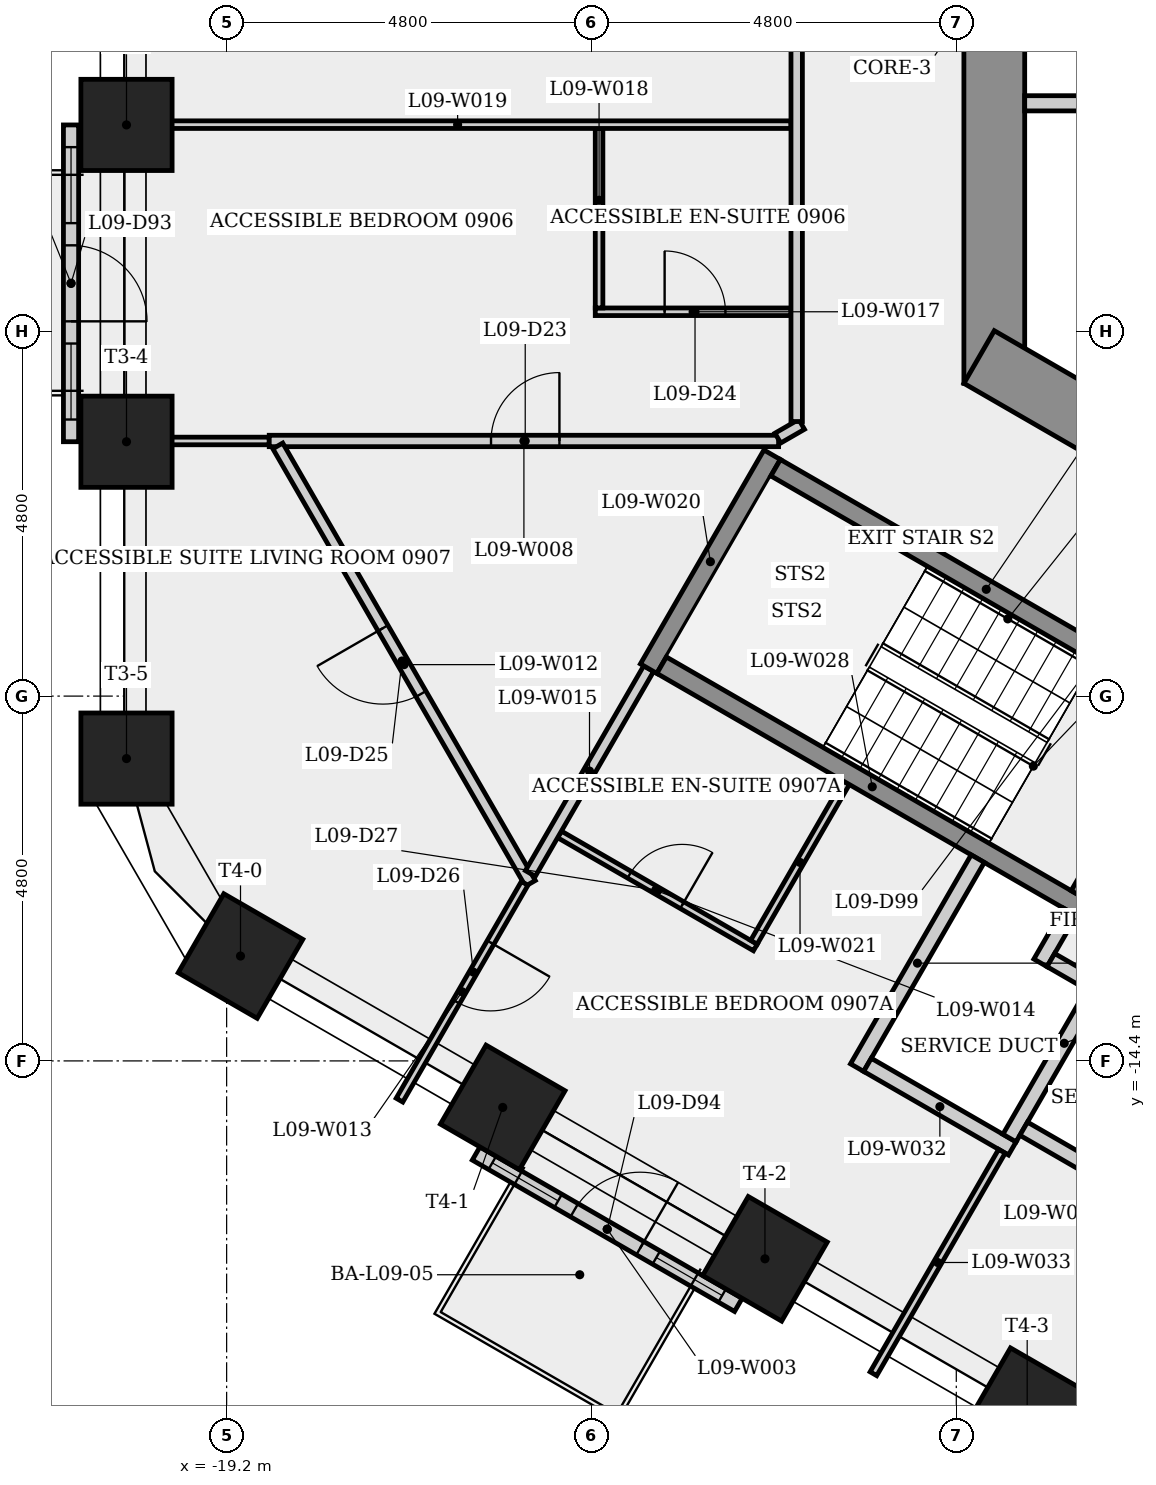
"""IFC4 building model, lengths in metres.
Left out: names, types, materials, properties, quantities, classifications, styles, units other than length and angle.
Written with IfcOpenShell. Run it as: python <this file> out.ifc"""

import sys

from ifc_helpers import new_model, si_unit, direction, frame, frame_2d, origin, origin_2d, place, context, subcontext, project, spatial, rectangle, extrude, element, fill, save


model = new_model("IFC4")
c1 = context("Model", 3, precision=1e-05, world=origin(), true_north=direction((0.0, 1.0)))
c2 = subcontext(c1, "Body", "Model", "MODEL_VIEW")
j1 = project(units=[si_unit("LENGTHUNIT", "METRE"), si_unit("PLANEANGLEUNIT", "RADIAN")], contexts=[c1])
p1 = place(None, origin())
s1 = spatial("IfcSite", under=j1, at=p1, CompositionType="ELEMENT")
p2 = place(p1, origin())
s2 = spatial("IfcBuilding", under=s1, at=p2, CompositionType="ELEMENT")
p3 = place(p2, frame((0.0, 0.0, 39.1)))
s3 = spatial("IfcBuildingStorey", under=s2, at=p3, CompositionType="ELEMENT", Elevation=39.1)
p4 = place(p3, frame((-9.1, 5.485, 0.0), z_axis=(0.0, 0.0, 1.0), x_axis=(0.0, -1.0, 0.0)))
e1 = element("IfcWall", 1, at=p4, inside=s3, PredefinedType="SHEAR", context=c2, shape_type="SweptSolid", body=[
    extrude(rectangle(XDim=10.97, YDim=0.8, at=frame_2d((5.485, 0.0))), origin(), (0.0, 0.0, 1.0), 3.4),
])
p5 = place(p4, frame((4.685, 0.0, 0.0)))
e2 = element("IfcOpeningElement", 2, at=p5, cuts=e1, PredefinedType="OPENING", context=c2, shape_type="SweptSolid", body=[
    extrude(rectangle(XDim=1.6, YDim=2.1, at=frame_2d((0.8, 1.05))), frame((0.0, 0.41, 0.0), z_axis=(0.0, -1.0, 0.0), x_axis=(1.0, 0.0, 0.0)), (0.0, 0.0, 1.0), 0.82),
])
p6 = place(p3, frame((-9.3, -5.138, 0.0), z_axis=(0.0, 0.0, 1.0), x_axis=(0.866023993627, -0.500002442456, 0.0)))
e3 = element("IfcWall", 3, at=p6, inside=s3, PredefinedType="SHEAR", context=c2, shape_type="SweptSolid", body=[
    extrude(rectangle(XDim=10.97, YDim=0.8, at=frame_2d((5.485, 0.0))), origin(), (0.0, 0.0, 1.0), 3.4),
])
p7 = place(p6, frame((3.192, 0.0, 0.0)))
e4 = element("IfcOpeningElement", 4, at=p7, cuts=e3, PredefinedType="OPENING", context=c2, shape_type="SweptSolid", body=[
    extrude(rectangle(XDim=0.9, YDim=2.1, at=frame_2d((0.45, 1.05))), frame((0.0, 0.41, 0.0), z_axis=(0.0, -1.0, 0.0), x_axis=(1.0, 0.0, 0.0)), (0.0, 0.0, 1.0), 0.82),
])
for number, where, z_axis, x_axis in (
    (5, (-20.518, -2.084, 0.0), (0.0, 0.0, 1.0), (-1.0, 0.0, 0.0)),
    (6, (-20.518, -6.253, 0.0), (0.0, 0.0, 1.0), (-1.0, 0.0, 0.0)),
    (7, (-20.518, -10.422, 0.0), (0.0, 0.0, 1.0), (-1.0, 0.0, 0.0)),
    (8, (-19.018, -13.02, 0.0), (0.0, 0.0, 1.0), (-0.5, -0.866, 0.0)),
    (9, (-15.567, -15.012, 0.0), (0.0, 0.0, 1.0), (-0.5, -0.866, 0.0)),
    (10, (-12.117, -17.004, 0.0), (0.0, 0.0, 1.0), (-0.5, -0.866, 0.0)),
    (11, (-8.667, -18.996, 0.0), (0.0, 0.0, 1.0), (-0.5, -0.866, 0.0)),
):
    element("IfcColumn", number, at=place(p3, frame(where, z_axis=z_axis, x_axis=x_axis)), inside=s3, PredefinedType="COLUMN", context=c2, shape_type="SweptSolid", body=[
        extrude(rectangle(XDim=1.2, YDim=1.2, at=origin_2d()), origin(), (0.0, 0.0, 1.0), 3.4),
    ])
p8 = place(p3, frame((-21.247, -2.085, 0.0), z_axis=(0.0, 0.0, 1.0), x_axis=(0.0, -1.0, 0.0)))
e12 = element("IfcWall", 12, at=p8, inside=s3, PredefinedType="SOLIDWALL", context=c2, shape_type="SweptSolid", body=[
    extrude(rectangle(XDim=4.168, YDim=0.2, at=frame_2d((2.084, 0.0))), origin(), (0.0, 0.0, 1.0), 3.4),
])
p9 = place(p8, frame((1.584, 0.0, 0.0)))
e13 = element("IfcOpeningElement", 13, at=p9, cuts=e12, PredefinedType="OPENING", context=c2, shape_type="SweptSolid", body=[
    extrude(rectangle(XDim=1.0, YDim=2.4, at=frame_2d((0.5, 1.2))), frame((0.0, 0.11, 0.0), z_axis=(0.0, -1.0, 0.0), x_axis=(1.0, 0.0, 0.0)), (0.0, 0.0, 1.0), 0.22),
])
p10 = place(p8, frame((0.292, 0.0, 0.9)))
e14 = element("IfcOpeningElement", 14, at=p10, cuts=e12, PredefinedType="OPENING", context=c2, shape_type="SweptSolid", body=[
    extrude(rectangle(XDim=1.0, YDim=1.5, at=frame_2d((0.5, 0.75))), frame((0.0, 0.11, 0.0), z_axis=(0.0, -1.0, 0.0), x_axis=(1.0, 0.0, 0.0)), (0.0, 0.0, 1.0), 0.22),
])
p11 = place(p8, frame((2.876, 0.0, 0.9)))
e15 = element("IfcOpeningElement", 15, at=p11, cuts=e12, PredefinedType="OPENING", context=c2, shape_type="SweptSolid", body=[
    extrude(rectangle(XDim=1.0, YDim=1.5, at=frame_2d((0.5, 0.75))), frame((0.0, 0.11, 0.0), z_axis=(0.0, -1.0, 0.0), x_axis=(1.0, 0.0, 0.0)), (0.0, 0.0, 1.0), 0.22),
])
p12 = place(p3, frame((-15.918, -15.618, 0.0), z_axis=(0.0, 0.0, 1.0), x_axis=(0.86602842894, -0.499994760241, 0.0)))
e16 = element("IfcWall", 16, at=p12, inside=s3, PredefinedType="SOLIDWALL", context=c2, shape_type="SweptSolid", body=[
    extrude(rectangle(XDim=3.984, YDim=0.2, at=frame_2d((1.992, 0.0))), origin(), (0.0, 0.0, 1.0), 3.4),
])
p13 = place(p12, frame((1.492, 0.0, 0.0)))
e17 = element("IfcOpeningElement", 17, at=p13, cuts=e16, PredefinedType="OPENING", context=c2, shape_type="SweptSolid", body=[
    extrude(rectangle(XDim=1.0, YDim=2.4, at=frame_2d((0.5, 1.2))), frame((0.0, 0.11, 0.0), z_axis=(0.0, -1.0, 0.0), x_axis=(1.0, 0.0, 0.0)), (0.0, 0.0, 1.0), 0.22),
])
p14 = place(p12, frame((0.246, 0.0, 0.9)))
e18 = element("IfcOpeningElement", 18, at=p14, cuts=e16, PredefinedType="OPENING", context=c2, shape_type="SweptSolid", body=[
    extrude(rectangle(XDim=1.0, YDim=1.5, at=frame_2d((0.5, 0.75))), frame((0.0, 0.11, 0.0), z_axis=(0.0, -1.0, 0.0), x_axis=(1.0, 0.0, 0.0)), (0.0, 0.0, 1.0), 0.22),
])
p15 = place(p12, frame((2.738, 0.0, 0.9)))
e19 = element("IfcOpeningElement", 19, at=p15, cuts=e16, PredefinedType="OPENING", context=c2, shape_type="SweptSolid", body=[
    extrude(rectangle(XDim=1.0, YDim=1.5, at=frame_2d((0.5, 0.75))), frame((0.0, 0.11, 0.0), z_axis=(0.0, -1.0, 0.0), x_axis=(1.0, 0.0, 0.0)), (0.0, 0.0, 1.0), 0.22),
])
p16 = place(p3, frame((-18.639, -6.243, 0.0), z_axis=(0.0, 0.0, 1.0), x_axis=(-1.0, 0.0, 0.0)))
e20 = element("IfcWall", 20, at=p16, inside=s3, PredefinedType="PARTITIONING", context=c2, shape_type="SweptSolid", body=[
    extrude(rectangle(XDim=1.908, YDim=0.1, at=frame_2d((0.954, 0.0))), origin(), (0.0, 0.0, 1.0), 3.05),
])
p17 = place(p3, frame((-18.639, -6.243, 0.0), z_axis=(0.0, 0.0, 1.0), x_axis=(1.0, 0.0, 0.0)))
e21 = element("IfcWall", 21, at=p17, inside=s3, PredefinedType="PARTITIONING", context=c2, shape_type="SweptSolid", body=[
    extrude(rectangle(XDim=6.701, YDim=0.15, at=frame_2d((3.351, 0.0))), origin(), (0.0, 0.0, 1.0), 3.05),
])
p18 = place(p17, frame((2.918, 0.0, 0.0)))
e22 = element("IfcOpeningElement", 22, at=p18, cuts=e21, PredefinedType="OPENING", context=c2, shape_type="SweptSolid", body=[
    extrude(rectangle(XDim=0.9, YDim=2.1, at=frame_2d((0.45, 1.05))), frame((0.0, 0.085, 0.0), z_axis=(0.0, -1.0, 0.0), x_axis=(1.0, 0.0, 0.0)), (0.0, 0.0, 1.0), 0.17),
])
p19 = place(p3, frame((-15.204, -12.064, 0.0), z_axis=(0.0, 0.0, 1.0), x_axis=(-0.500026652407, 0.866010015463, 0.0)))
e23 = element("IfcWall", 23, at=p19, inside=s3, PredefinedType="PARTITIONING", context=c2, shape_type="SweptSolid", body=[
    extrude(rectangle(XDim=6.646, YDim=0.15, at=frame_2d((3.323, 0.0))), origin(), (0.0, 0.0, 1.0), 3.05),
])
p20 = place(p19, frame((2.878, 0.0, 0.0)))
e24 = element("IfcOpeningElement", 24, at=p20, cuts=e23, PredefinedType="OPENING", context=c2, shape_type="SweptSolid", body=[
    extrude(rectangle(XDim=1.0, YDim=2.1, at=frame_2d((0.5, 1.05))), frame((0.0, 0.085, 0.0), z_axis=(0.0, -1.0, 0.0), x_axis=(1.0, 0.0, 0.0)), (0.0, 0.0, 1.0), 0.17),
])
p21 = place(p3, frame((-15.279, -12.064, 0.0), z_axis=(0.0, 0.0, 1.0), x_axis=(-0.500013311227, -0.866017718408, 0.0)))
e25 = element("IfcWall", 25, at=p21, inside=s3, PredefinedType="PARTITIONING", context=c2, shape_type="SweptSolid", body=[
    extrude(rectangle(XDim=3.294, YDim=0.1, at=frame_2d((1.647, 0.0))), origin(), (0.0, 0.0, 1.0), 3.05),
])
p22 = place(p21, frame((0.899, 0.0, 0.0)))
e26 = element("IfcOpeningElement", 26, at=p22, cuts=e25, PredefinedType="OPENING", context=c2, shape_type="SweptSolid", body=[
    extrude(rectangle(XDim=0.9, YDim=2.1, at=frame_2d((0.45, 1.05))), frame((0.0, 0.06, 0.0), z_axis=(0.0, -1.0, 0.0), x_axis=(1.0, 0.0, 0.0)), (0.0, 0.0, 1.0), 0.12),
])
p23 = place(p3, frame((-14.82, -11.42, 0.0), z_axis=(0.0, 0.0, 1.0), x_axis=(0.866017493347, -0.500013701029, 0.0)))
e27 = element("IfcWall", 27, at=p23, inside=s3, PredefinedType="PARTITIONING", context=c2, shape_type="SweptSolid", body=[
    extrude(rectangle(XDim=2.975, YDim=0.1, at=frame_2d((1.488, 0.0))), origin(), (0.0, 0.0, 1.0), 3.05),
])
p24 = place(p23, frame((1.062, 0.0, 0.0)))
e28 = element("IfcOpeningElement", 28, at=p24, cuts=e27, PredefinedType="OPENING", context=c2, shape_type="SweptSolid", body=[
    extrude(rectangle(XDim=0.8, YDim=2.1, at=frame_2d((0.4, 1.05))), frame((0.0, 0.06, 0.0), z_axis=(0.0, -1.0, 0.0), x_axis=(1.0, 0.0, 0.0)), (0.0, 0.0, 1.0), 0.12),
])
p25 = place(p3, frame((-15.204, -11.934, 0.0), z_axis=(0.0, 0.0, 1.0), x_axis=(0.500037089193, 0.86600398927, 0.0)))
e29 = element("IfcWall", 29, at=p25, inside=s3, PredefinedType="PARTITIONING", context=c2, shape_type="SweptSolid", body=[
    extrude(rectangle(XDim=3.112, YDim=0.15, at=frame_2d((1.556, 0.0))), origin(), (0.0, 0.0, 1.0), 3.05),
])
p26 = place(p3, frame((-14.35, -4.543, 0.0), z_axis=(0.0, 0.0, 1.0), x_axis=(1.0, 0.0, 0.0)))
e30 = element("IfcWall", 30, at=p26, inside=s3, PredefinedType="PARTITIONING", context=c2, shape_type="SweptSolid", body=[
    extrude(rectangle(XDim=2.575, YDim=0.1, at=frame_2d((1.288, 0.0))), origin(), (0.0, 0.0, 1.0), 3.05),
])
p27 = place(p26, frame((0.913, 0.0, 0.0)))
e31 = element("IfcOpeningElement", 31, at=p27, cuts=e30, PredefinedType="OPENING", context=c2, shape_type="SweptSolid", body=[
    extrude(rectangle(XDim=0.8, YDim=2.1, at=frame_2d((0.4, 1.05))), frame((0.0, 0.06, 0.0), z_axis=(0.0, -1.0, 0.0), x_axis=(1.0, 0.0, 0.0)), (0.0, 0.0, 1.0), 0.12),
])
p28 = place(p3, frame((-14.3, -2.131, 0.0), z_axis=(0.0, 0.0, 1.0), x_axis=(0.0, -1.0, 0.0)))
e32 = element("IfcWall", 32, at=p28, inside=s3, PredefinedType="PARTITIONING", context=c2, shape_type="SweptSolid", body=[
    extrude(rectangle(XDim=2.362, YDim=0.1, at=frame_2d((1.181, 0.0))), origin(), (0.0, 0.0, 1.0), 3.05),
])
p29 = place(p3, frame((-20.547, -2.081, 0.0), z_axis=(0.0, 0.0, 1.0), x_axis=(1.0, 0.0, 0.0)))
e33 = element("IfcWall", 33, at=p29, inside=s3, PredefinedType="PARTITIONING", context=c2, shape_type="SweptSolid", body=[
    extrude(rectangle(XDim=8.772, YDim=0.1, at=frame_2d((4.386, 0.0))), origin(), (0.0, 0.0, 1.0), 3.05),
])
p30 = place(p3, frame((-13.648, -9.239, 0.0), z_axis=(0.0, 0.0, 1.0), x_axis=(0.500017246033, 0.866015446554, 0.0)))
e34 = element("IfcWall", 34, at=p30, inside=s3, PredefinedType="SHEAR", context=c2, shape_type="SweptSolid", body=[
    extrude(rectangle(XDim=3.25, YDim=0.25, at=frame_2d((1.625, 0.0))), origin(), (0.0, 0.0, 1.0), 3.05),
])
p31 = place(p3, frame((-12.262, -12.839, 0.0), z_axis=(0.0, 0.0, 1.0), x_axis=(0.499972286653, 0.866041403502, 0.0)))
e35 = element("IfcWall", 35, at=p31, inside=s3, PredefinedType="PARTITIONING", context=c2, shape_type="SweptSolid", body=[
    extrude(rectangle(XDim=2.425, YDim=0.1, at=frame_2d((1.212, 0.0))), origin(), (0.0, 0.0, 1.0), 3.05),
])
p32 = place(p3, frame((-11.977, -6.595, 0.0), z_axis=(0.0, 0.0, 1.0), x_axis=(0.866025499775, -0.499999833739, 0.0)))
e36 = element("IfcWall", 36, at=p32, inside=s3, PredefinedType="SHEAR", context=c2, shape_type="SweptSolid", body=[
    extrude(rectangle(XDim=6.4, YDim=0.25, at=frame_2d((3.2, 0.0))), origin(), (0.0, 0.0, 1.0), 3.05),
])
p33 = place(p32, frame((5.025, 0.0, 0.0)))
e37 = element("IfcOpeningElement", 37, at=p33, cuts=e36, PredefinedType="OPENING", context=c2, shape_type="SweptSolid", body=[
    extrude(rectangle(XDim=1.0, YDim=2.1, at=frame_2d((0.5, 1.05))), frame((0.0, 0.135, 0.0), z_axis=(0.0, -1.0, 0.0), x_axis=(1.0, 0.0, 0.0)), (0.0, 0.0, 1.0), 0.27),
])
p34 = place(p3, frame((-11.948, -6.206, 0.0), z_axis=(0.0, 0.0, 1.0), x_axis=(0.865949522258, 0.500131407633, 0.0)))
e38 = element("IfcWall", 38, at=p34, inside=s3, PredefinedType="PARTITIONING", context=c2, shape_type="SweptSolid", body=[
    extrude(rectangle(XDim=0.362, YDim=0.15, at=frame_2d((0.181, 0.0))), origin(), (0.0, 0.0, 1.0), 3.05),
])
p35 = place(p3, frame((-11.7, -5.987, 0.0), z_axis=(0.0, 0.0, 1.0), x_axis=(0.0, 1.0, 0.0)))
e39 = element("IfcWall", 39, at=p35, inside=s3, PredefinedType="PARTITIONING", context=c2, shape_type="SweptSolid", body=[
    extrude(rectangle(XDim=11.975, YDim=0.15, at=frame_2d((5.987, 0.0))), origin(), (0.0, 0.0, 1.0), 3.05),
])
p36 = place(p35, frame((7.455, 0.0, 0.0)))
e40 = element("IfcOpeningElement", 40, at=p36, cuts=e39, PredefinedType="OPENING", context=c2, shape_type="SweptSolid", body=[
    extrude(rectangle(XDim=1.0, YDim=2.1, at=frame_2d((0.5, 1.05))), frame((0.0, 0.085, 0.0), z_axis=(0.0, -1.0, 0.0), x_axis=(1.0, 0.0, 0.0)), (0.0, 0.0, 1.0), 0.17),
])
p37 = place(p3, frame((-13.477, -9.193, 0.0), z_axis=(0.0, 0.0, 1.0), x_axis=(0.866025499775, -0.499999833739, 0.0)))
e41 = element("IfcWall", 41, at=p37, inside=s3, PredefinedType="SHEAR", context=c2, shape_type="SweptSolid", body=[
    extrude(rectangle(XDim=6.4, YDim=0.25, at=frame_2d((3.2, 0.0))), origin(), (0.0, 0.0, 1.0), 3.05),
])
p38 = place(p3, frame((-10.905, -14.489, 0.0), z_axis=(0.0, 0.0, 1.0), x_axis=(0.499959856469, 0.866048579423, 0.0)))
e42 = element("IfcWall", 42, at=p38, inside=s3, PredefinedType="PLUMBINGWALL", context=c2, shape_type="SweptSolid", body=[
    extrude(rectangle(XDim=3.175, YDim=0.2, at=frame_2d((1.587, 0.0))), origin(), (0.0, 0.0, 1.0), 3.05),
])
p39 = place(p3, frame((-8.863, -15.552, 0.0), z_axis=(0.0, 0.0, 1.0), x_axis=(-0.866035918664, 0.499981787252, 0.0)))
e43 = element("IfcWall", 43, at=p39, inside=s3, PredefinedType="PLUMBINGWALL", context=c2, shape_type="SweptSolid", body=[
    extrude(rectangle(XDim=2.2, YDim=0.2, at=frame_2d((1.1, 0.0))), origin(), (0.0, 0.0, 1.0), 3.05),
])
p40 = place(p3, frame((-9.0, -15.588, 0.0), z_axis=(0.0, 0.0, 1.0), x_axis=(-0.499968344795, -0.866043679154, 0.0)))
e44 = element("IfcWall", 44, at=p40, inside=s3, PredefinedType="PARTITIONING", context=c2, shape_type="SweptSolid", body=[
    extrude(rectangle(XDim=3.381, YDim=0.1, at=frame_2d((1.69, 0.0))), origin(), (0.0, 0.0, 1.0), 3.05),
])
p41 = place(p3, frame((-8.493, -13.11, 0.0), z_axis=(0.0, 0.0, 1.0), x_axis=(0.500067724834, 0.865986299303, 0.0)))
e45 = element("IfcWall", 45, at=p41, inside=s3, PredefinedType="PLUMBINGWALL", context=c2, shape_type="SweptSolid", body=[
    extrude(rectangle(XDim=0.775, YDim=0.2, at=frame_2d((0.388, 0.0))), origin(), (0.0, 0.0, 1.0), 3.05),
])
p42 = place(p3, frame((-7.7, -13.337, 0.0), z_axis=(0.0, 0.0, 1.0), x_axis=(-0.500001309137, -0.866024647952, 0.0)))
e46 = element("IfcWall", 46, at=p42, inside=s3, PredefinedType="PLUMBINGWALL", context=c2, shape_type="SweptSolid", body=[
    extrude(rectangle(XDim=2.4, YDim=0.2, at=frame_2d((1.2, 0.0))), origin(), (0.0, 0.0, 1.0), 3.05),
])
p43 = place(p3, frame((-7.836, -13.373, 0.0), z_axis=(0.0, 0.0, 1.0), x_axis=(-0.866232998003, 0.499640263761, 0.0)))
e47 = element("IfcWall", 47, at=p43, inside=s3, PredefinedType="PLUMBINGWALL", context=c2, shape_type="SweptSolid", body=[
    extrude(rectangle(XDim=0.6, YDim=0.2, at=frame_2d((0.3, 0.0))), origin(), (0.0, 0.0, 1.0), 3.05),
])
p44 = place(p3, frame((-7.475, -1.8, 0.0), z_axis=(0.0, 0.0, 1.0), x_axis=(-1.0, 0.0, 0.0)))
e48 = element("IfcWall", 48, at=p44, inside=s3, PredefinedType="PARTITIONING", context=c2, shape_type="SweptSolid", body=[
    extrude(rectangle(XDim=1.225, YDim=0.2, at=frame_2d((0.613, 0.0))), origin(), (0.0, 0.0, 1.0), 3.05),
])
p45 = place(p3, frame((-6.808, -16.392, 0.0), z_axis=(0.0, 0.0, 1.0), x_axis=(-0.866008176907, 0.50002983664, 0.0)))
e49 = element("IfcWall", 49, at=p45, inside=s3, PredefinedType="PLUMBINGWALL", context=c2, shape_type="SweptSolid", body=[
    extrude(rectangle(XDim=2.2, YDim=0.2, at=frame_2d((1.1, 0.0))), origin(), (0.0, 0.0, 1.0), 3.05),
])
p46 = place(p3, frame((-6.605, -9.841, 0.0), z_axis=(0.0, 0.0, 1.0), x_axis=(-0.499996545922, -0.866027397988, 0.0)))
e50 = element("IfcWall", 50, at=p46, inside=s3, PredefinedType="SHEAR", context=c2, shape_type="SweptSolid", body=[
    extrude(rectangle(XDim=2.75, YDim=0.25, at=frame_2d((1.375, 0.0))), origin(), (0.0, 0.0, 1.0), 3.05),
])
p47 = place(p46, frame((0.875, 0.0, 0.0)))
e51 = element("IfcOpeningElement", 51, at=p47, cuts=e50, PredefinedType="OPENING", context=c2, shape_type="SweptSolid", body=[
    extrude(rectangle(XDim=1.0, YDim=2.1, at=frame_2d((0.5, 1.05))), frame((0.0, 0.135, 0.0), z_axis=(0.0, -1.0, 0.0), x_axis=(1.0, 0.0, 0.0)), (0.0, 0.0, 1.0), 0.27),
])
p48 = place(p9, origin())
e52 = element("IfcDoor", 52, at=p48, inside=s3, OperationType="SINGLE_SWING_RIGHT", PredefinedType="DOOR", context=c2, shape_type="SweptSolid", body=[
    extrude(rectangle(XDim=1.0, YDim=2.4, at=frame_2d((0.5, 1.2))), frame((0.0, 0.025, 0.0), z_axis=(0.0, -1.0, 0.0), x_axis=(1.0, 0.0, 0.0)), (0.0, 0.0, 1.0), 0.05),
])
fill(e13, e52)
p49 = place(p10, origin())
e53 = element("IfcWindow", 53, at=p49, inside=s3, PartitioningType="SINGLE_PANEL", PredefinedType="WINDOW", context=c2, shape_type="SweptSolid", body=[
    extrude(rectangle(XDim=1.0, YDim=1.5, at=frame_2d((0.5, 0.75))), frame((0.0, 0.03, 0.0), z_axis=(0.0, -1.0, 0.0), x_axis=(1.0, 0.0, 0.0)), (0.0, 0.0, 1.0), 0.06),
])
fill(e14, e53)
p50 = place(p11, origin())
e54 = element("IfcWindow", 54, at=p50, inside=s3, PartitioningType="SINGLE_PANEL", PredefinedType="WINDOW", context=c2, shape_type="SweptSolid", body=[
    extrude(rectangle(XDim=1.0, YDim=1.5, at=frame_2d((0.5, 0.75))), frame((0.0, 0.03, 0.0), z_axis=(0.0, -1.0, 0.0), x_axis=(1.0, 0.0, 0.0)), (0.0, 0.0, 1.0), 0.06),
])
fill(e15, e54)
p51 = place(p13, origin())
e55 = element("IfcDoor", 55, at=p51, inside=s3, OperationType="SINGLE_SWING_RIGHT", PredefinedType="DOOR", context=c2, shape_type="SweptSolid", body=[
    extrude(rectangle(XDim=1.0, YDim=2.4, at=frame_2d((0.5, 1.2))), frame((0.0, 0.025, 0.0), z_axis=(0.0, -1.0, 0.0), x_axis=(1.0, 0.0, 0.0)), (0.0, 0.0, 1.0), 0.05),
])
fill(e17, e55)
p52 = place(p14, origin())
e56 = element("IfcWindow", 56, at=p52, inside=s3, PartitioningType="SINGLE_PANEL", PredefinedType="WINDOW", context=c2, shape_type="SweptSolid", body=[
    extrude(rectangle(XDim=1.0, YDim=1.5, at=frame_2d((0.5, 0.75))), frame((0.0, 0.03, 0.0), z_axis=(0.0, -1.0, 0.0), x_axis=(1.0, 0.0, 0.0)), (0.0, 0.0, 1.0), 0.06),
])
fill(e18, e56)
p53 = place(p15, origin())
e57 = element("IfcWindow", 57, at=p53, inside=s3, PartitioningType="SINGLE_PANEL", PredefinedType="WINDOW", context=c2, shape_type="SweptSolid", body=[
    extrude(rectangle(XDim=1.0, YDim=1.5, at=frame_2d((0.5, 0.75))), frame((0.0, 0.03, 0.0), z_axis=(0.0, -1.0, 0.0), x_axis=(1.0, 0.0, 0.0)), (0.0, 0.0, 1.0), 0.06),
])
fill(e19, e57)
p54 = place(p18, origin())
e58 = element("IfcDoor", 58, at=p54, inside=s3, OperationType="SINGLE_SWING_RIGHT", PredefinedType="DOOR", context=c2, shape_type="SweptSolid", body=[
    extrude(rectangle(XDim=0.9, YDim=2.1, at=frame_2d((0.45, 1.05))), frame((0.0, 0.025, 0.0), z_axis=(0.0, -1.0, 0.0), x_axis=(1.0, 0.0, 0.0)), (0.0, 0.0, 1.0), 0.05),
])
fill(e22, e58)
p55 = place(p27, origin())
e59 = element("IfcDoor", 59, at=p55, inside=s3, OperationType="SINGLE_SWING_LEFT", PredefinedType="DOOR", context=c2, shape_type="SweptSolid", body=[
    extrude(rectangle(XDim=0.8, YDim=2.1, at=frame_2d((0.4, 1.05))), frame((0.0, 0.025, 0.0), z_axis=(0.0, -1.0, 0.0), x_axis=(1.0, 0.0, 0.0)), (0.0, 0.0, 1.0), 0.05),
])
fill(e31, e59)
p56 = place(p20, origin())
e60 = element("IfcDoor", 60, at=p56, inside=s3, OperationType="SINGLE_SWING_RIGHT", PredefinedType="DOOR", context=c2, shape_type="SweptSolid", body=[
    extrude(rectangle(XDim=1.0, YDim=2.1, at=frame_2d((0.5, 1.05))), frame((0.0, 0.025, 0.0), z_axis=(0.0, -1.0, 0.0), x_axis=(1.0, 0.0, 0.0)), (0.0, 0.0, 1.0), 0.05),
])
fill(e24, e60)
p57 = place(p22, origin())
e61 = element("IfcDoor", 61, at=p57, inside=s3, OperationType="SINGLE_SWING_LEFT", PredefinedType="DOOR", context=c2, shape_type="SweptSolid", body=[
    extrude(rectangle(XDim=0.9, YDim=2.1, at=frame_2d((0.45, 1.05))), frame((0.0, 0.025, 0.0), z_axis=(0.0, -1.0, 0.0), x_axis=(1.0, 0.0, 0.0)), (0.0, 0.0, 1.0), 0.05),
])
fill(e26, e61)
p58 = place(p24, origin())
e62 = element("IfcDoor", 62, at=p58, inside=s3, OperationType="SINGLE_SWING_RIGHT", PredefinedType="DOOR", context=c2, shape_type="SweptSolid", body=[
    extrude(rectangle(XDim=0.8, YDim=2.1, at=frame_2d((0.4, 1.05))), frame((0.0, 0.025, 0.0), z_axis=(0.0, -1.0, 0.0), x_axis=(1.0, 0.0, 0.0)), (0.0, 0.0, 1.0), 0.05),
])
fill(e28, e62)
save(model, sys.argv[1])
